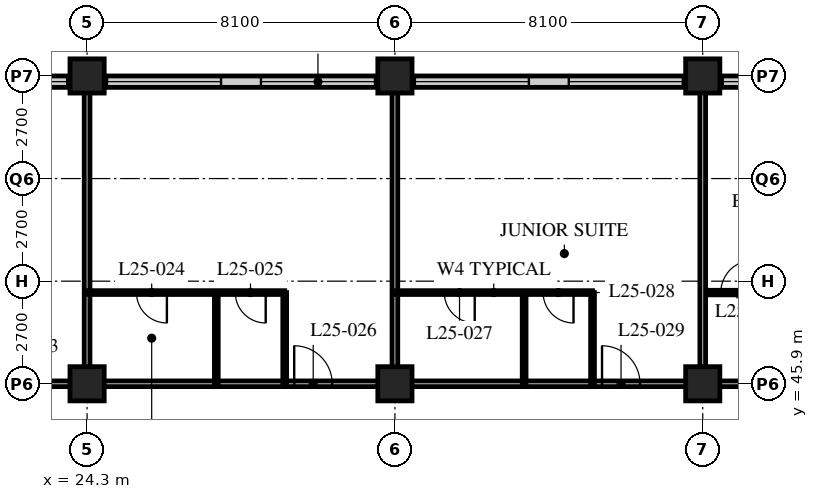
"""IFC4 building model, lengths in metres.
Left out: names, types, materials, properties, quantities, classifications, styles, units other than length and angle.
Written with IfcOpenShell. Run it as: python <this file> out.ifc"""

import sys

from ifc_helpers import new_model, si_unit, direction, frame, frame_2d, origin, origin_2d, place, context, subcontext, project, spatial, rectangle, hollow_rectangle, extrude, element, fill, save


model = new_model("IFC4")
c1 = context("Model", 3, precision=1e-05, world=origin(), true_north=direction((0.0, 1.0)))
c2 = subcontext(c1, "Body", "Model", "MODEL_VIEW")
j1 = project(units=[si_unit("LENGTHUNIT", "METRE"), si_unit("PLANEANGLEUNIT", "RADIAN")], contexts=[c1])
p1 = place(None, origin())
s1 = spatial("IfcSite", under=j1, at=p1, CompositionType="ELEMENT")
p2 = place(p1, origin())
s2 = spatial("IfcBuilding", under=s1, at=p2, CompositionType="ELEMENT")
p3 = place(p2, frame((0.0, 0.0, 103.4)))
s3 = spatial("IfcBuildingStorey", under=s2, at=p3, CompositionType="ELEMENT", Elevation=103.4)
p4 = place(p3, frame((24.3, 45.9, 0.0), z_axis=(0.0, 0.0, 1.0), x_axis=(1.0, 0.0, 0.0)))
e1 = element("IfcColumn", 1, at=p4, inside=s3, PredefinedType="COLUMN", context=c2, shape_type="SweptSolid", body=[
    extrude(hollow_rectangle(XDim=0.9, YDim=0.9, WallThickness=0.1, at=origin_2d()), origin(), (0.0, 0.0, 1.0), 3.4),
])
p5 = place(p3, frame((24.3, 54.0, 0.0), z_axis=(0.0, 0.0, 1.0), x_axis=(1.0, 0.0, 0.0)))
e2 = element("IfcColumn", 2, at=p5, inside=s3, PredefinedType="COLUMN", context=c2, shape_type="SweptSolid", body=[
    extrude(hollow_rectangle(XDim=0.9, YDim=0.9, WallThickness=0.09, at=origin_2d()), origin(), (0.0, 0.0, 1.0), 3.4),
])
p6 = place(p3, frame((32.4, 45.9, 0.0), z_axis=(0.0, 0.0, 1.0), x_axis=(1.0, 0.0, 0.0)))
e3 = element("IfcColumn", 3, at=p6, inside=s3, PredefinedType="COLUMN", context=c2, shape_type="SweptSolid", body=[
    extrude(hollow_rectangle(XDim=0.9, YDim=0.9, WallThickness=0.1, at=origin_2d()), origin(), (0.0, 0.0, 1.0), 3.4),
])
p7 = place(p3, frame((32.4, 54.0, 0.0), z_axis=(0.0, 0.0, 1.0), x_axis=(1.0, 0.0, 0.0)))
e4 = element("IfcColumn", 4, at=p7, inside=s3, PredefinedType="COLUMN", context=c2, shape_type="SweptSolid", body=[
    extrude(hollow_rectangle(XDim=0.9, YDim=0.9, WallThickness=0.09, at=origin_2d()), origin(), (0.0, 0.0, 1.0), 3.4),
])
p8 = place(p3, frame((40.5, 45.9, 0.0), z_axis=(0.0, 0.0, 1.0), x_axis=(1.0, 0.0, 0.0)))
e5 = element("IfcColumn", 5, at=p8, inside=s3, PredefinedType="COLUMN", context=c2, shape_type="SweptSolid", body=[
    extrude(hollow_rectangle(XDim=0.9, YDim=0.9, WallThickness=0.1, at=origin_2d()), origin(), (0.0, 0.0, 1.0), 3.4),
])
p9 = place(p3, frame((40.5, 54.0, 0.0), z_axis=(0.0, 0.0, 1.0), x_axis=(1.0, 0.0, 0.0)))
e6 = element("IfcColumn", 6, at=p9, inside=s3, PredefinedType="COLUMN", context=c2, shape_type="SweptSolid", body=[
    extrude(hollow_rectangle(XDim=0.9, YDim=0.9, WallThickness=0.09, at=origin_2d()), origin(), (0.0, 0.0, 1.0), 3.4),
])
p10 = place(p3, frame((48.3, 53.85, 0.0), z_axis=(0.0, 0.0, 1.0), x_axis=(-1.0, 0.0, 0.0)))
e7 = element("IfcWall", 7, at=p10, inside=s3, PredefinedType="SOLIDWALL", context=c2, shape_type="SweptSolid", body=[
    extrude(rectangle(XDim=40.2, YDim=0.3, at=frame_2d((20.1, 0.0))), origin(), (0.0, 0.0, 1.0), 3.19),
])
p11 = place(p10, frame((0.225, 0.0, 0.9)))
e8 = element("IfcOpeningElement", 8, at=p11, cuts=e7, PredefinedType="OPENING", context=c2, shape_type="SweptSolid", body=[
    extrude(rectangle(XDim=3.0, YDim=2.0, at=frame_2d((1.5, 1.0))), frame((0.0, 0.16, 0.0), z_axis=(0.0, -1.0, 0.0), x_axis=(1.0, 0.0, 0.0)), (0.0, 0.0, 1.0), 0.32),
])
p12 = place(p10, frame((4.275, 0.0, 0.9)))
e9 = element("IfcOpeningElement", 9, at=p12, cuts=e7, PredefinedType="OPENING", context=c2, shape_type="SweptSolid", body=[
    extrude(rectangle(XDim=3.0, YDim=2.0, at=frame_2d((1.5, 1.0))), frame((0.0, 0.16, 0.0), z_axis=(0.0, -1.0, 0.0), x_axis=(1.0, 0.0, 0.0)), (0.0, 0.0, 1.0), 0.32),
])
p13 = place(p10, frame((8.325, 0.0, 0.9)))
e10 = element("IfcOpeningElement", 10, at=p13, cuts=e7, PredefinedType="OPENING", context=c2, shape_type="SweptSolid", body=[
    extrude(rectangle(XDim=3.0, YDim=2.0, at=frame_2d((1.5, 1.0))), frame((0.0, 0.16, 0.0), z_axis=(0.0, -1.0, 0.0), x_axis=(1.0, 0.0, 0.0)), (0.0, 0.0, 1.0), 0.32),
])
p14 = place(p10, frame((12.375, 0.0, 0.9)))
e11 = element("IfcOpeningElement", 11, at=p14, cuts=e7, PredefinedType="OPENING", context=c2, shape_type="SweptSolid", body=[
    extrude(rectangle(XDim=3.0, YDim=2.0, at=frame_2d((1.5, 1.0))), frame((0.0, 0.16, 0.0), z_axis=(0.0, -1.0, 0.0), x_axis=(1.0, 0.0, 0.0)), (0.0, 0.0, 1.0), 0.32),
])
p15 = place(p10, frame((16.425, 0.0, 0.9)))
e12 = element("IfcOpeningElement", 12, at=p15, cuts=e7, PredefinedType="OPENING", context=c2, shape_type="SweptSolid", body=[
    extrude(rectangle(XDim=3.0, YDim=2.0, at=frame_2d((1.5, 1.0))), frame((0.0, 0.16, 0.0), z_axis=(0.0, -1.0, 0.0), x_axis=(1.0, 0.0, 0.0)), (0.0, 0.0, 1.0), 0.32),
])
p16 = place(p10, frame((20.475, 0.0, 0.9)))
e13 = element("IfcOpeningElement", 13, at=p16, cuts=e7, PredefinedType="OPENING", context=c2, shape_type="SweptSolid", body=[
    extrude(rectangle(XDim=3.0, YDim=2.0, at=frame_2d((1.5, 1.0))), frame((0.0, 0.16, 0.0), z_axis=(0.0, -1.0, 0.0), x_axis=(1.0, 0.0, 0.0)), (0.0, 0.0, 1.0), 0.32),
])
p17 = place(p10, frame((24.525, 0.0, 0.9)))
e14 = element("IfcOpeningElement", 14, at=p17, cuts=e7, PredefinedType="OPENING", context=c2, shape_type="SweptSolid", body=[
    extrude(rectangle(XDim=3.0, YDim=2.0, at=frame_2d((1.5, 1.0))), frame((0.0, 0.16, 0.0), z_axis=(0.0, -1.0, 0.0), x_axis=(1.0, 0.0, 0.0)), (0.0, 0.0, 1.0), 0.32),
])
p18 = place(p10, frame((28.575, 0.0, 0.9)))
e15 = element("IfcOpeningElement", 15, at=p18, cuts=e7, PredefinedType="OPENING", context=c2, shape_type="SweptSolid", body=[
    extrude(rectangle(XDim=3.0, YDim=2.0, at=frame_2d((1.5, 1.0))), frame((0.0, 0.16, 0.0), z_axis=(0.0, -1.0, 0.0), x_axis=(1.0, 0.0, 0.0)), (0.0, 0.0, 1.0), 0.32),
])
p19 = place(p10, frame((32.625, 0.0, 0.9)))
e16 = element("IfcOpeningElement", 16, at=p19, cuts=e7, PredefinedType="OPENING", context=c2, shape_type="SweptSolid", body=[
    extrude(rectangle(XDim=3.0, YDim=2.0, at=frame_2d((1.5, 1.0))), frame((0.0, 0.16, 0.0), z_axis=(0.0, -1.0, 0.0), x_axis=(1.0, 0.0, 0.0)), (0.0, 0.0, 1.0), 0.32),
])
p20 = place(p10, frame((36.675, 0.0, 0.9)))
e17 = element("IfcOpeningElement", 17, at=p20, cuts=e7, PredefinedType="OPENING", context=c2, shape_type="SweptSolid", body=[
    extrude(rectangle(XDim=3.0, YDim=2.0, at=frame_2d((1.5, 1.0))), frame((0.0, 0.16, 0.0), z_axis=(0.0, -1.0, 0.0), x_axis=(1.0, 0.0, 0.0)), (0.0, 0.0, 1.0), 0.32),
])
p21 = place(p3, frame((12.15, 45.9, 0.0), z_axis=(0.0, 0.0, 1.0), x_axis=(1.0, 0.0, 0.0)))
e18 = element("IfcWall", 18, at=p21, inside=s3, PredefinedType="PARTITIONING", context=c2, shape_type="SweptSolid", body=[
    extrude(rectangle(XDim=32.4, YDim=0.15, at=frame_2d((16.2, 0.0))), origin(), (0.0, 0.0, 1.0), 2.578),
])
p22 = place(p21, frame((9.5, 0.0, 0.0)))
e19 = element("IfcOpeningElement", 19, at=p22, cuts=e18, PredefinedType="OPENING", context=c2, shape_type="SweptSolid", body=[
    extrude(rectangle(XDim=1.0, YDim=2.1, at=frame_2d((0.5, 1.05))), frame((0.0, 0.085, 0.0), z_axis=(0.0, -1.0, 0.0), x_axis=(1.0, 0.0, 0.0)), (0.0, 0.0, 1.0), 0.17),
])
p23 = place(p21, frame((17.6, 0.0, 0.0)))
e20 = element("IfcOpeningElement", 20, at=p23, cuts=e18, PredefinedType="OPENING", context=c2, shape_type="SweptSolid", body=[
    extrude(rectangle(XDim=1.0, YDim=2.1, at=frame_2d((0.5, 1.05))), frame((0.0, 0.085, 0.0), z_axis=(0.0, -1.0, 0.0), x_axis=(1.0, 0.0, 0.0)), (0.0, 0.0, 1.0), 0.17),
])
p24 = place(p21, frame((25.7, 0.0, 0.0)))
e21 = element("IfcOpeningElement", 21, at=p24, cuts=e18, PredefinedType="OPENING", context=c2, shape_type="SweptSolid", body=[
    extrude(rectangle(XDim=1.0, YDim=2.1, at=frame_2d((0.5, 1.05))), frame((0.0, 0.085, 0.0), z_axis=(0.0, -1.0, 0.0), x_axis=(1.0, 0.0, 0.0)), (0.0, 0.0, 1.0), 0.17),
])
p25 = place(p21, frame((29.875, 0.0, 0.0)))
e22 = element("IfcOpeningElement", 22, at=p25, cuts=e18, PredefinedType="OPENING", context=c2, shape_type="SweptSolid", body=[
    extrude(rectangle(XDim=1.0, YDim=2.1, at=frame_2d((0.5, 1.05))), frame((0.0, 0.085, 0.0), z_axis=(0.0, -1.0, 0.0), x_axis=(1.0, 0.0, 0.0)), (0.0, 0.0, 1.0), 0.17),
])
p26 = place(p21, frame((1.525, 0.0, 0.0)))
e23 = element("IfcOpeningElement", 23, at=p26, cuts=e18, PredefinedType="OPENING", context=c2, shape_type="SweptSolid", body=[
    extrude(rectangle(XDim=1.0, YDim=2.1, at=frame_2d((0.5, 1.05))), frame((0.0, 0.085, 0.0), z_axis=(0.0, -1.0, 0.0), x_axis=(1.0, 0.0, 0.0)), (0.0, 0.0, 1.0), 0.17),
])
p27 = place(p3, frame((24.3, 45.9, 0.0), z_axis=(0.0, 0.0, 1.0), x_axis=(0.0, 1.0, 0.0)))
e24 = element("IfcWall", 24, at=p27, inside=s3, PredefinedType="PARTITIONING", context=c2, shape_type="SweptSolid", body=[
    extrude(rectangle(XDim=7.8, YDim=0.15, at=frame_2d((3.9, 0.0))), origin(), (0.0, 0.0, 1.0), 2.64),
])
p28 = place(p3, frame((24.3, 48.3, 0.0), z_axis=(0.0, 0.0, 1.0), x_axis=(1.0, 0.0, 0.0)))
e25 = element("IfcWall", 25, at=p28, inside=s3, PredefinedType="PARTITIONING", context=c2, shape_type="SweptSolid", body=[
    extrude(rectangle(XDim=5.2, YDim=0.1, at=frame_2d((2.6, 0.0))), origin(), (0.0, 0.0, 1.0), 3.19),
])
p29 = place(p28, frame((1.3, 0.0, 0.0)))
e26 = element("IfcOpeningElement", 26, at=p29, cuts=e25, PredefinedType="OPENING", context=c2, shape_type="SweptSolid", body=[
    extrude(rectangle(XDim=0.8, YDim=2.1, at=frame_2d((0.4, 1.05))), frame((0.0, 0.06, 0.0), z_axis=(0.0, -1.0, 0.0), x_axis=(1.0, 0.0, 0.0)), (0.0, 0.0, 1.0), 0.12),
])
p30 = place(p28, frame((3.9, 0.0, 0.0)))
e27 = element("IfcOpeningElement", 27, at=p30, cuts=e25, PredefinedType="OPENING", context=c2, shape_type="SweptSolid", body=[
    extrude(rectangle(XDim=0.8, YDim=2.1, at=frame_2d((0.4, 1.05))), frame((0.0, 0.06, 0.0), z_axis=(0.0, -1.0, 0.0), x_axis=(1.0, 0.0, 0.0)), (0.0, 0.0, 1.0), 0.12),
])
for number, where, z_axis, x_axis in (
    (28, (27.7, 45.9, 0.0), (0.0, 0.0, 1.0), (0.0, 1.0, 0.0)),
    (29, (29.5, 45.9, 0.0), (0.0, 0.0, 1.0), (0.0, 1.0, 0.0)),
):
    element("IfcWall", number, at=place(p3, frame(where, z_axis=z_axis, x_axis=x_axis)), inside=s3, PredefinedType="PARTITIONING", context=c2, shape_type="SweptSolid", body=[
        extrude(rectangle(XDim=2.4, YDim=0.1, at=frame_2d((1.2, 0.0))), origin(), (0.0, 0.0, 1.0), 3.19),
    ])
p31 = place(p3, frame((32.4, 45.9, 0.0), z_axis=(0.0, 0.0, 1.0), x_axis=(0.0, 1.0, 0.0)))
e30 = element("IfcWall", 30, at=p31, inside=s3, PredefinedType="PARTITIONING", context=c2, shape_type="SweptSolid", body=[
    extrude(rectangle(XDim=7.8, YDim=0.15, at=frame_2d((3.9, 0.0))), origin(), (0.0, 0.0, 1.0), 2.64),
])
p32 = place(p3, frame((32.4, 48.3, 0.0), z_axis=(0.0, 0.0, 1.0), x_axis=(1.0, 0.0, 0.0)))
e31 = element("IfcWall", 31, at=p32, inside=s3, PredefinedType="PARTITIONING", context=c2, shape_type="SweptSolid", body=[
    extrude(rectangle(XDim=5.2, YDim=0.1, at=frame_2d((2.6, 0.0))), origin(), (0.0, 0.0, 1.0), 3.19),
])
p33 = place(p32, frame((1.3, 0.0, 0.0)))
e32 = element("IfcOpeningElement", 32, at=p33, cuts=e31, PredefinedType="OPENING", context=c2, shape_type="SweptSolid", body=[
    extrude(rectangle(XDim=0.8, YDim=2.1, at=frame_2d((0.4, 1.05))), frame((0.0, 0.06, 0.0), z_axis=(0.0, -1.0, 0.0), x_axis=(1.0, 0.0, 0.0)), (0.0, 0.0, 1.0), 0.12),
])
p34 = place(p32, frame((3.9, 0.0, 0.0)))
e33 = element("IfcOpeningElement", 33, at=p34, cuts=e31, PredefinedType="OPENING", context=c2, shape_type="SweptSolid", body=[
    extrude(rectangle(XDim=0.8, YDim=2.1, at=frame_2d((0.4, 1.05))), frame((0.0, 0.06, 0.0), z_axis=(0.0, -1.0, 0.0), x_axis=(1.0, 0.0, 0.0)), (0.0, 0.0, 1.0), 0.12),
])
for number, where, z_axis, x_axis in (
    (34, (35.8, 45.9, 0.0), (0.0, 0.0, 1.0), (0.0, 1.0, 0.0)),
    (35, (37.6, 45.9, 0.0), (0.0, 0.0, 1.0), (0.0, 1.0, 0.0)),
):
    element("IfcWall", number, at=place(p3, frame(where, z_axis=z_axis, x_axis=x_axis)), inside=s3, PredefinedType="PARTITIONING", context=c2, shape_type="SweptSolid", body=[
        extrude(rectangle(XDim=2.4, YDim=0.1, at=frame_2d((1.2, 0.0))), origin(), (0.0, 0.0, 1.0), 3.19),
    ])
p35 = place(p3, frame((40.5, 48.3, 0.0), z_axis=(0.0, 0.0, 1.0), x_axis=(1.0, 0.0, 0.0)))
e36 = element("IfcWall", 36, at=p35, inside=s3, PredefinedType="PARTITIONING", context=c2, shape_type="SweptSolid", body=[
    extrude(rectangle(XDim=8.05, YDim=0.12, at=frame_2d((4.025, 0.0))), origin(), (0.0, 0.0, 1.0), 3.19),
])
p36 = place(p35, frame((0.475, 0.0, 0.0)))
e37 = element("IfcOpeningElement", 37, at=p36, cuts=e36, PredefinedType="OPENING", context=c2, shape_type="SweptSolid", body=[
    extrude(rectangle(XDim=0.85, YDim=2.1, at=frame_2d((0.425, 1.05))), frame((0.0, 0.07, 0.0), z_axis=(0.0, -1.0, 0.0), x_axis=(1.0, 0.0, 0.0)), (0.0, 0.0, 1.0), 0.14),
])
p37 = place(p35, frame((4.325, 0.0, 0.0)))
e38 = element("IfcOpeningElement", 38, at=p37, cuts=e36, PredefinedType="OPENING", context=c2, shape_type="SweptSolid", body=[
    extrude(rectangle(XDim=0.85, YDim=2.1, at=frame_2d((0.425, 1.05))), frame((0.0, 0.07, 0.0), z_axis=(0.0, -1.0, 0.0), x_axis=(1.0, 0.0, 0.0)), (0.0, 0.0, 1.0), 0.14),
])
p38 = place(p3, frame((40.5, 45.9, 0.0), z_axis=(0.0, 0.0, 1.0), x_axis=(0.0, 1.0, 0.0)))
e39 = element("IfcWall", 39, at=p38, inside=s3, PredefinedType="PARTITIONING", context=c2, shape_type="SweptSolid", body=[
    extrude(rectangle(XDim=7.8, YDim=0.15, at=frame_2d((3.9, 0.0))), origin(), (0.0, 0.0, 1.0), 2.64),
])
p39 = place(p12, origin())
e40 = element("IfcWindow", 40, at=p39, inside=s3, PartitioningType="SINGLE_PANEL", PredefinedType="WINDOW", context=c2, shape_type="SweptSolid", body=[
    extrude(rectangle(XDim=3.0, YDim=2.0, at=frame_2d((1.5, 1.0))), frame((0.0, 0.03, 0.0), z_axis=(0.0, -1.0, 0.0), x_axis=(1.0, 0.0, 0.0)), (0.0, 0.0, 1.0), 0.06),
])
fill(e9, e40)
p40 = place(p13, origin())
e41 = element("IfcWindow", 41, at=p40, inside=s3, PartitioningType="SINGLE_PANEL", PredefinedType="WINDOW", context=c2, shape_type="SweptSolid", body=[
    extrude(rectangle(XDim=3.0, YDim=2.0, at=frame_2d((1.5, 1.0))), frame((0.0, 0.03, 0.0), z_axis=(0.0, -1.0, 0.0), x_axis=(1.0, 0.0, 0.0)), (0.0, 0.0, 1.0), 0.06),
])
fill(e10, e41)
p41 = place(p14, origin())
e42 = element("IfcWindow", 42, at=p41, inside=s3, PartitioningType="SINGLE_PANEL", PredefinedType="WINDOW", context=c2, shape_type="SweptSolid", body=[
    extrude(rectangle(XDim=3.0, YDim=2.0, at=frame_2d((1.5, 1.0))), frame((0.0, 0.03, 0.0), z_axis=(0.0, -1.0, 0.0), x_axis=(1.0, 0.0, 0.0)), (0.0, 0.0, 1.0), 0.06),
])
fill(e11, e42)
p42 = place(p15, origin())
e43 = element("IfcWindow", 43, at=p42, inside=s3, PartitioningType="SINGLE_PANEL", PredefinedType="WINDOW", context=c2, shape_type="SweptSolid", body=[
    extrude(rectangle(XDim=3.0, YDim=2.0, at=frame_2d((1.5, 1.0))), frame((0.0, 0.03, 0.0), z_axis=(0.0, -1.0, 0.0), x_axis=(1.0, 0.0, 0.0)), (0.0, 0.0, 1.0), 0.06),
])
fill(e12, e43)
p43 = place(p16, origin())
e44 = element("IfcWindow", 44, at=p43, inside=s3, PartitioningType="SINGLE_PANEL", PredefinedType="WINDOW", context=c2, shape_type="SweptSolid", body=[
    extrude(rectangle(XDim=3.0, YDim=2.0, at=frame_2d((1.5, 1.0))), frame((0.0, 0.03, 0.0), z_axis=(0.0, -1.0, 0.0), x_axis=(1.0, 0.0, 0.0)), (0.0, 0.0, 1.0), 0.06),
])
fill(e13, e44)
p44 = place(p17, origin())
e45 = element("IfcWindow", 45, at=p44, inside=s3, PartitioningType="SINGLE_PANEL", PredefinedType="WINDOW", context=c2, shape_type="SweptSolid", body=[
    extrude(rectangle(XDim=3.0, YDim=2.0, at=frame_2d((1.5, 1.0))), frame((0.0, 0.03, 0.0), z_axis=(0.0, -1.0, 0.0), x_axis=(1.0, 0.0, 0.0)), (0.0, 0.0, 1.0), 0.06),
])
fill(e14, e45)
p45 = place(p29, origin())
e46 = element("IfcDoor", 46, at=p45, inside=s3, OperationType="SINGLE_SWING_LEFT", PredefinedType="DOOR", context=c2, shape_type="SweptSolid", body=[
    extrude(rectangle(XDim=0.8, YDim=2.1, at=frame_2d((0.4, 1.05))), frame((0.0, 0.025, 0.0), z_axis=(0.0, -1.0, 0.0), x_axis=(1.0, 0.0, 0.0)), (0.0, 0.0, 1.0), 0.05),
])
fill(e26, e46)
p46 = place(p30, origin())
e47 = element("IfcDoor", 47, at=p46, inside=s3, OperationType="SINGLE_SWING_LEFT", PredefinedType="DOOR", context=c2, shape_type="SweptSolid", body=[
    extrude(rectangle(XDim=0.8, YDim=2.1, at=frame_2d((0.4, 1.05))), frame((0.0, 0.025, 0.0), z_axis=(0.0, -1.0, 0.0), x_axis=(1.0, 0.0, 0.0)), (0.0, 0.0, 1.0), 0.05),
])
fill(e27, e47)
p47 = place(p23, origin())
e48 = element("IfcDoor", 48, at=p47, inside=s3, OperationType="SINGLE_SWING_LEFT", PredefinedType="DOOR", context=c2, shape_type="SweptSolid", body=[
    extrude(rectangle(XDim=1.0, YDim=2.1, at=frame_2d((0.5, 1.05))), frame((0.0, 0.025, 0.0), z_axis=(0.0, -1.0, 0.0), x_axis=(1.0, 0.0, 0.0)), (0.0, 0.0, 1.0), 0.05),
])
fill(e20, e48)
p48 = place(p33, origin())
e49 = element("IfcDoor", 49, at=p48, inside=s3, OperationType="SINGLE_SWING_LEFT", PredefinedType="DOOR", context=c2, shape_type="SweptSolid", body=[
    extrude(rectangle(XDim=0.8, YDim=2.1, at=frame_2d((0.4, 1.05))), frame((0.0, 0.025, 0.0), z_axis=(0.0, -1.0, 0.0), x_axis=(1.0, 0.0, 0.0)), (0.0, 0.0, 1.0), 0.05),
])
fill(e32, e49)
p49 = place(p34, origin())
e50 = element("IfcDoor", 50, at=p49, inside=s3, OperationType="SINGLE_SWING_LEFT", PredefinedType="DOOR", context=c2, shape_type="SweptSolid", body=[
    extrude(rectangle(XDim=0.8, YDim=2.1, at=frame_2d((0.4, 1.05))), frame((0.0, 0.025, 0.0), z_axis=(0.0, -1.0, 0.0), x_axis=(1.0, 0.0, 0.0)), (0.0, 0.0, 1.0), 0.05),
])
fill(e33, e50)
p50 = place(p24, origin())
e51 = element("IfcDoor", 51, at=p50, inside=s3, OperationType="SINGLE_SWING_LEFT", PredefinedType="DOOR", context=c2, shape_type="SweptSolid", body=[
    extrude(rectangle(XDim=1.0, YDim=2.1, at=frame_2d((0.5, 1.05))), frame((0.0, 0.025, 0.0), z_axis=(0.0, -1.0, 0.0), x_axis=(1.0, 0.0, 0.0)), (0.0, 0.0, 1.0), 0.05),
])
fill(e21, e51)
p51 = place(p36, origin())
e52 = element("IfcDoor", 52, at=p51, inside=s3, OperationType="SINGLE_SWING_RIGHT", PredefinedType="DOOR", context=c2, shape_type="SweptSolid", body=[
    extrude(rectangle(XDim=0.85, YDim=2.1, at=frame_2d((0.425, 1.05))), frame((0.0, 0.025, 0.0), z_axis=(0.0, -1.0, 0.0), x_axis=(1.0, 0.0, 0.0)), (0.0, 0.0, 1.0), 0.05),
])
fill(e37, e52)
save(model, sys.argv[1])
